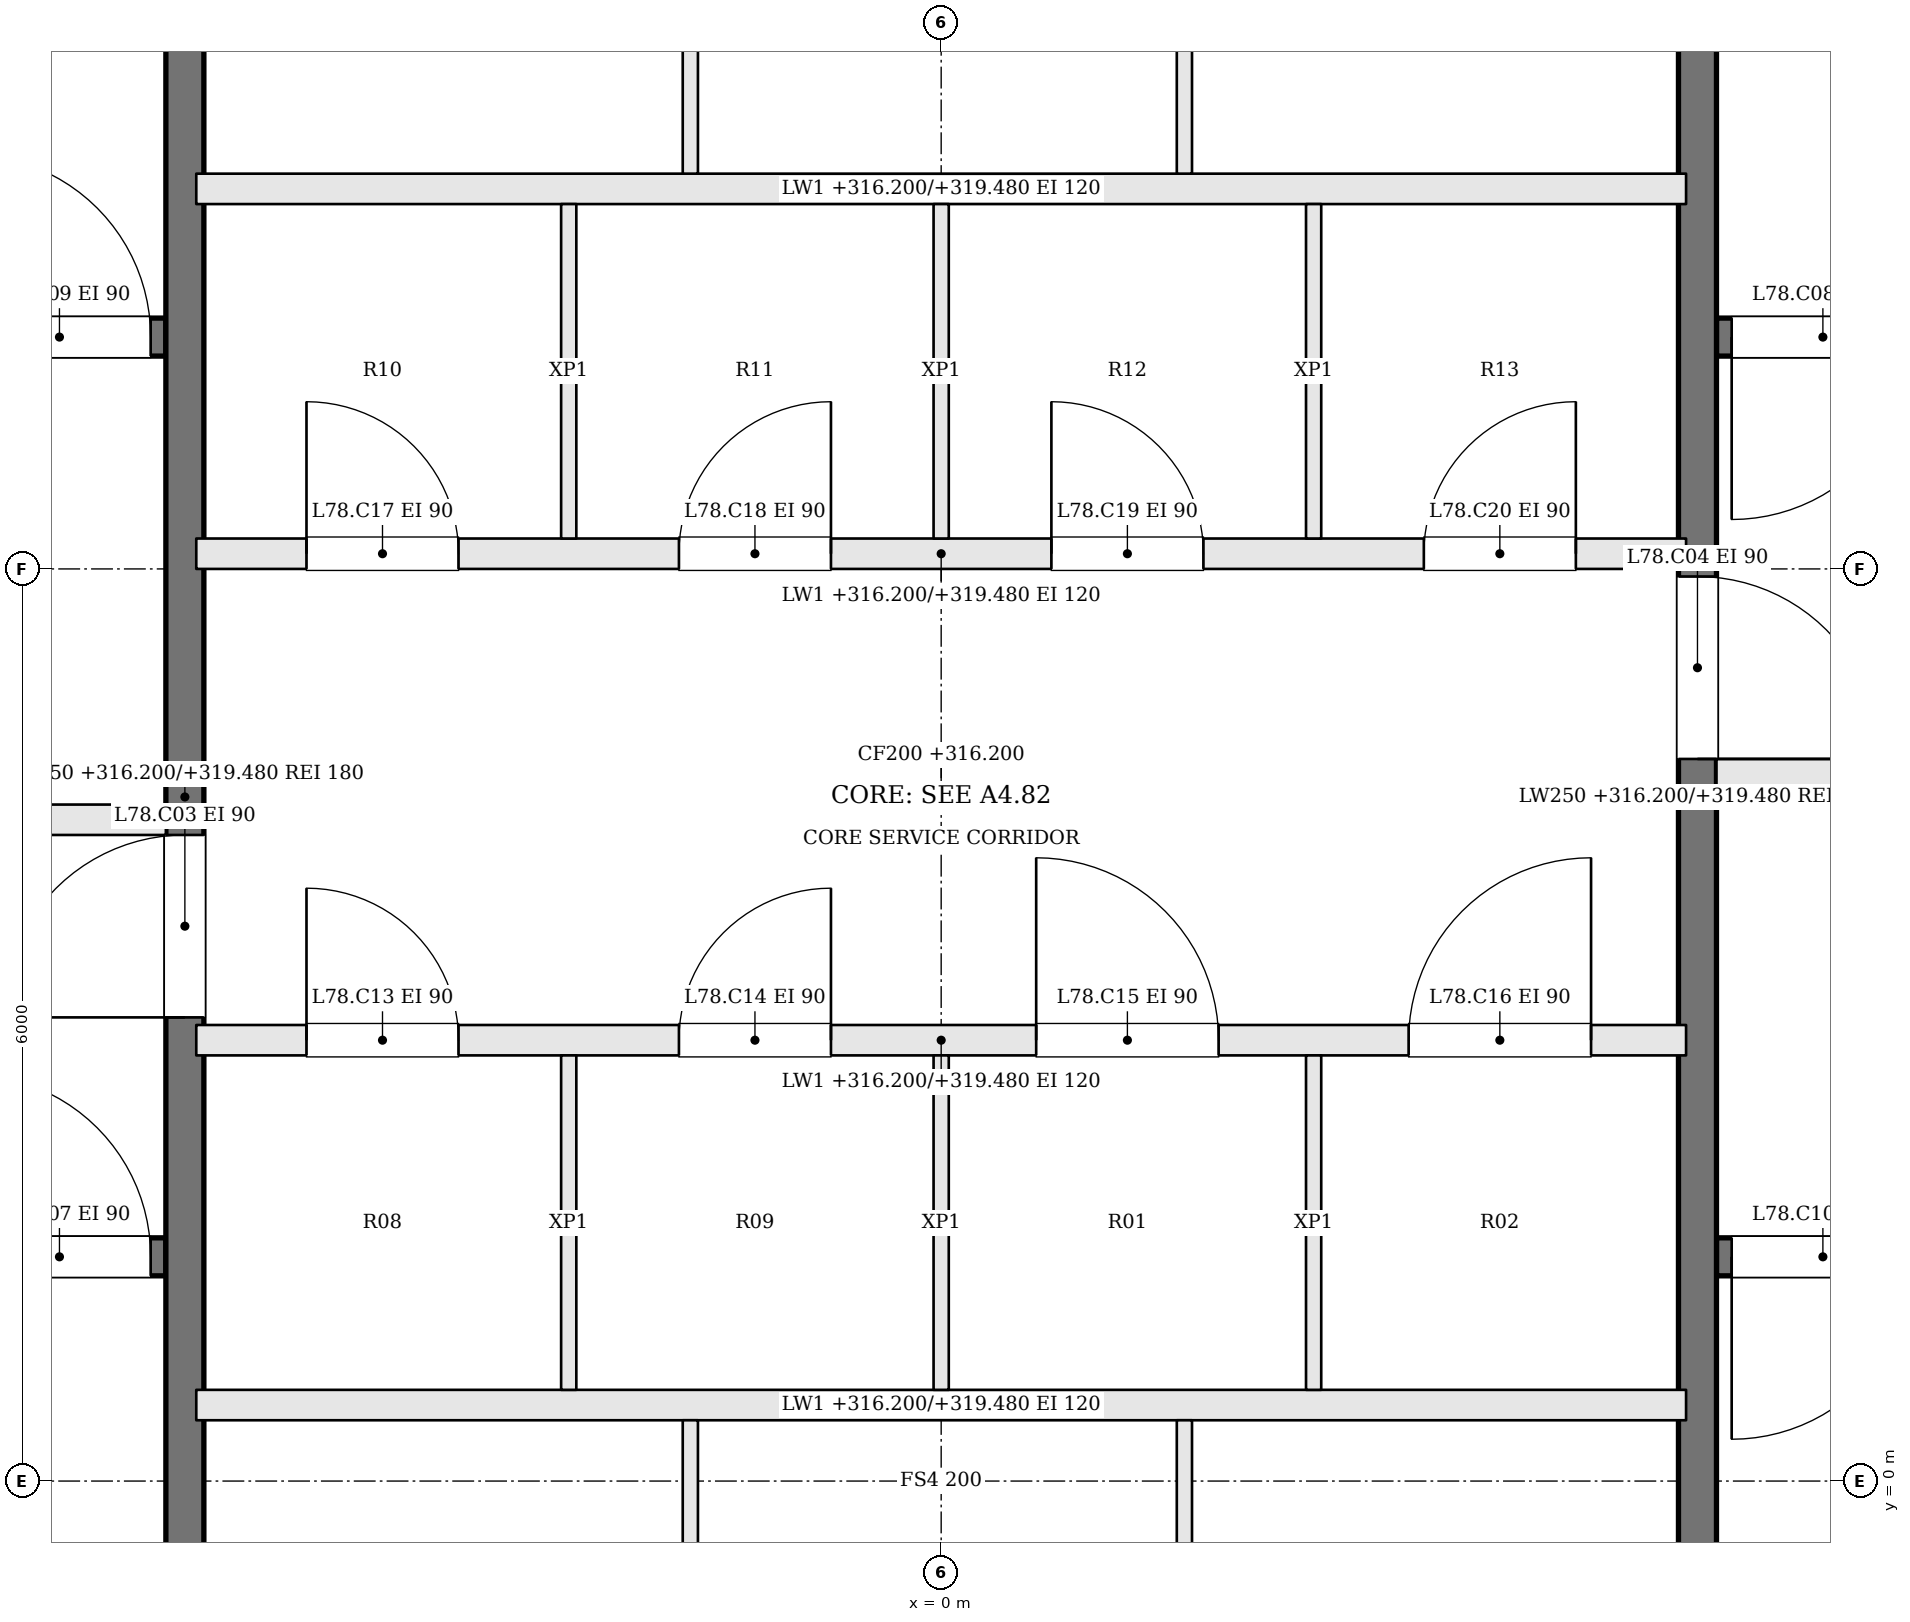
"""IFC4 building model, lengths in metres.
Left out: names, types, materials, properties, quantities, classifications, styles, units other than length and angle.
Written with IfcOpenShell. Run it as: python <this file> out.ifc"""

import sys

from ifc_helpers import new_model, si_unit, direction, frame, frame_2d, origin, place, context, subcontext, project, spatial, rectangle, extrude, element, fill, save


model = new_model("IFC4")
c1 = context("Model", 3, precision=1e-05, world=origin(), true_north=direction((0.0, 1.0)))
c2 = subcontext(c1, "Body", "Model", "MODEL_VIEW")
j1 = project(units=[si_unit("LENGTHUNIT", "METRE"), si_unit("PLANEANGLEUNIT", "RADIAN")], contexts=[c1])
p1 = place(None, origin())
s1 = spatial("IfcSite", under=j1, at=p1, CompositionType="ELEMENT")
p2 = place(p1, origin())
s2 = spatial("IfcBuilding", under=s1, at=p2, CompositionType="ELEMENT")
p3 = place(p2, frame((0.0, 0.0, 316.2)))
s3 = spatial("IfcBuildingStorey", under=s2, at=p3, CompositionType="ELEMENT", Elevation=316.2)
p4 = place(p3, frame((-12.2, 1.475, 0.0), z_axis=(0.0, 0.0, 1.0), x_axis=(1.0, 0.0, 0.0)))
e1 = element("IfcWall", 1, at=p4, inside=s3, PredefinedType="SOLIDWALL", context=c2, shape_type="SweptSolid", body=[
    extrude(rectangle(XDim=7.1, YDim=0.25, at=frame_2d((3.55, 0.0))), origin(), (0.0, 0.0, 1.0), 3.28),
])
p5 = place(p4, frame((5.8, 0.0, 0.0)))
e2 = element("IfcOpeningElement", 2, at=p5, cuts=e1, PredefinedType="OPENING", context=c2, shape_type="SweptSolid", body=[
    extrude(rectangle(XDim=1.2, YDim=2.1, at=frame_2d((0.6, 1.05))), frame((0.0, 0.135, 0.0), z_axis=(0.0, -1.0, 0.0), x_axis=(1.0, 0.0, 0.0)), (0.0, 0.0, 1.0), 0.27),
])
p6 = place(p3, frame((12.2, 7.525, 0.0), z_axis=(0.0, 0.0, 1.0), x_axis=(-1.0, 0.0, 0.0)))
e3 = element("IfcWall", 3, at=p6, inside=s3, PredefinedType="SOLIDWALL", context=c2, shape_type="SweptSolid", body=[
    extrude(rectangle(XDim=7.1, YDim=0.25, at=frame_2d((3.55, 0.0))), origin(), (0.0, 0.0, 1.0), 3.28),
])
p7 = place(p6, frame((5.8, 0.0, 0.0)))
e4 = element("IfcOpeningElement", 4, at=p7, cuts=e3, PredefinedType="OPENING", context=c2, shape_type="SweptSolid", body=[
    extrude(rectangle(XDim=1.2, YDim=2.1, at=frame_2d((0.6, 1.05))), frame((0.0, 0.135, 0.0), z_axis=(0.0, -1.0, 0.0), x_axis=(1.0, 0.0, 0.0)), (0.0, 0.0, 1.0), 0.27),
])
p8 = place(p3, frame((-12.2, 4.35, 0.0), z_axis=(0.0, 0.0, 1.0), x_axis=(1.0, 0.0, 0.0)))
e5 = element("IfcWall", 5, at=p8, inside=s3, PredefinedType="SOLIDWALL", context=c2, shape_type="SweptSolid", body=[
    extrude(rectangle(XDim=7.1, YDim=0.2, at=frame_2d((3.55, 0.0))), origin(), (0.0, 0.0, 1.0), 3.28),
])
p9 = place(p8, frame((4.4, 0.0, 0.0)))
e6 = element("IfcOpeningElement", 6, at=p9, cuts=e5, PredefinedType="OPENING", context=c2, shape_type="SweptSolid", body=[
    extrude(rectangle(XDim=1.2, YDim=2.1, at=frame_2d((0.6, 1.05))), frame((0.0, 0.11, 0.0), z_axis=(0.0, -1.0, 0.0), x_axis=(1.0, 0.0, 0.0)), (0.0, 0.0, 1.0), 0.22),
])
p10 = place(p8, frame((1.1, 0.0, 0.0)))
e7 = element("IfcOpeningElement", 7, at=p10, cuts=e5, PredefinedType="OPENING", context=c2, shape_type="SweptSolid", body=[
    extrude(rectangle(XDim=1.2, YDim=2.1, at=frame_2d((0.6, 1.05))), frame((0.0, 0.11, 0.0), z_axis=(0.0, -1.0, 0.0), x_axis=(1.0, 0.0, 0.0)), (0.0, 0.0, 1.0), 0.22),
])
p11 = place(p3, frame((12.2, 4.65, 0.0), z_axis=(0.0, 0.0, 1.0), x_axis=(-1.0, 0.0, 0.0)))
e8 = element("IfcWall", 8, at=p11, inside=s3, PredefinedType="SOLIDWALL", context=c2, shape_type="SweptSolid", body=[
    extrude(rectangle(XDim=7.1, YDim=0.2, at=frame_2d((3.55, 0.0))), origin(), (0.0, 0.0, 1.0), 3.28),
])
p12 = place(p11, frame((4.4, 0.0, 0.0)))
e9 = element("IfcOpeningElement", 9, at=p12, cuts=e8, PredefinedType="OPENING", context=c2, shape_type="SweptSolid", body=[
    extrude(rectangle(XDim=1.2, YDim=2.1, at=frame_2d((0.6, 1.05))), frame((0.0, 0.11, 0.0), z_axis=(0.0, -1.0, 0.0), x_axis=(1.0, 0.0, 0.0)), (0.0, 0.0, 1.0), 0.22),
])
p13 = place(p11, frame((1.1, 0.0, 0.0)))
e10 = element("IfcOpeningElement", 10, at=p13, cuts=e8, PredefinedType="OPENING", context=c2, shape_type="SweptSolid", body=[
    extrude(rectangle(XDim=1.2, YDim=2.1, at=frame_2d((0.6, 1.05))), frame((0.0, 0.11, 0.0), z_axis=(0.0, -1.0, 0.0), x_axis=(1.0, 0.0, 0.0)), (0.0, 0.0, 1.0), 0.22),
])
p14 = place(p3, frame((-12.2, 7.525, 0.0), z_axis=(0.0, 0.0, 1.0), x_axis=(1.0, 0.0, 0.0)))
e11 = element("IfcWall", 11, at=p14, inside=s3, PredefinedType="SOLIDWALL", context=c2, shape_type="SweptSolid", body=[
    extrude(rectangle(XDim=7.1, YDim=0.25, at=frame_2d((3.55, 0.0))), origin(), (0.0, 0.0, 1.0), 3.28),
])
p15 = place(p14, frame((5.8, 0.0, 0.0)))
e12 = element("IfcOpeningElement", 12, at=p15, cuts=e11, PredefinedType="OPENING", context=c2, shape_type="SweptSolid", body=[
    extrude(rectangle(XDim=1.2, YDim=2.1, at=frame_2d((0.6, 1.05))), frame((0.0, 0.135, 0.0), z_axis=(0.0, -1.0, 0.0), x_axis=(1.0, 0.0, 0.0)), (0.0, 0.0, 1.0), 0.27),
])
p16 = place(p3, frame((12.2, 1.475, 0.0), z_axis=(0.0, 0.0, 1.0), x_axis=(-1.0, 0.0, 0.0)))
e13 = element("IfcWall", 13, at=p16, inside=s3, PredefinedType="SOLIDWALL", context=c2, shape_type="SweptSolid", body=[
    extrude(rectangle(XDim=7.1, YDim=0.25, at=frame_2d((3.55, 0.0))), origin(), (0.0, 0.0, 1.0), 3.28),
])
p17 = place(p16, frame((5.8, 0.0, 0.0)))
e14 = element("IfcOpeningElement", 14, at=p17, cuts=e13, PredefinedType="OPENING", context=c2, shape_type="SweptSolid", body=[
    extrude(rectangle(XDim=1.2, YDim=2.1, at=frame_2d((0.6, 1.05))), frame((0.0, 0.135, 0.0), z_axis=(0.0, -1.0, 0.0), x_axis=(1.0, 0.0, 0.0)), (0.0, 0.0, 1.0), 0.27),
])
p18 = place(p3, frame((-4.975, -2.2, 0.0), z_axis=(0.0, 0.0, 1.0), x_axis=(0.0, 1.0, 0.0)))
e15 = element("IfcWall", 15, at=p18, inside=s3, PredefinedType="SOLIDWALL", context=c2, shape_type="SweptSolid", body=[
    extrude(rectangle(XDim=13.4, YDim=0.25, at=frame_2d((6.7, 0.0))), origin(), (0.0, 0.0, 1.0), 3.28),
])
p19 = place(p18, frame((5.25, 0.0, 0.0)))
e16 = element("IfcOpeningElement", 16, at=p19, cuts=e15, PredefinedType="OPENING", context=c2, shape_type="SweptSolid", body=[
    extrude(rectangle(XDim=1.2, YDim=2.1, at=frame_2d((0.6, 1.05))), frame((0.0, 0.135, 0.0), z_axis=(0.0, -1.0, 0.0), x_axis=(1.0, 0.0, 0.0)), (0.0, 0.0, 1.0), 0.27),
])
p20 = place(p3, frame((4.975, 11.2, 0.0), z_axis=(0.0, 0.0, 1.0), x_axis=(0.0, -1.0, 0.0)))
e17 = element("IfcWall", 17, at=p20, inside=s3, PredefinedType="SOLIDWALL", context=c2, shape_type="SweptSolid", body=[
    extrude(rectangle(XDim=13.4, YDim=0.25, at=frame_2d((6.7, 0.0))), origin(), (0.0, 0.0, 1.0), 3.28),
])
p21 = place(p20, frame((5.25, 0.0, 0.0)))
e18 = element("IfcOpeningElement", 18, at=p21, cuts=e17, PredefinedType="OPENING", context=c2, shape_type="SweptSolid", body=[
    extrude(rectangle(XDim=1.2, YDim=2.1, at=frame_2d((0.6, 1.05))), frame((0.0, 0.135, 0.0), z_axis=(0.0, -1.0, 0.0), x_axis=(1.0, 0.0, 0.0)), (0.0, 0.0, 1.0), 0.27),
])
p22 = place(p3, frame((-4.9, 0.5, 0.0), z_axis=(0.0, 0.0, 1.0), x_axis=(1.0, 0.0, 0.0)))
e19 = element("IfcWall", 19, at=p22, inside=s3, PredefinedType="SOLIDWALL", context=c2, shape_type="SweptSolid", body=[
    extrude(rectangle(XDim=9.8, YDim=0.2, at=frame_2d((4.9, 0.0))), origin(), (0.0, 0.0, 1.0), 3.28),
])
p23 = place(p3, frame((-4.9, 2.9, 0.0), z_axis=(0.0, 0.0, 1.0), x_axis=(1.0, 0.0, 0.0)))
e20 = element("IfcWall", 20, at=p23, inside=s3, PredefinedType="SOLIDWALL", context=c2, shape_type="SweptSolid", body=[
    extrude(rectangle(XDim=9.8, YDim=0.2, at=frame_2d((4.9, 0.0))), origin(), (0.0, 0.0, 1.0), 3.28),
])
p24 = place(p23, frame((0.725, 0.0, 0.0)))
e21 = element("IfcOpeningElement", 21, at=p24, cuts=e20, PredefinedType="OPENING", context=c2, shape_type="SweptSolid", body=[
    extrude(rectangle(XDim=1.0, YDim=2.1, at=frame_2d((0.5, 1.05))), frame((0.0, 0.11, 0.0), z_axis=(0.0, -1.0, 0.0), x_axis=(1.0, 0.0, 0.0)), (0.0, 0.0, 1.0), 0.22),
])
p25 = place(p23, frame((3.175, 0.0, 0.0)))
e22 = element("IfcOpeningElement", 22, at=p25, cuts=e20, PredefinedType="OPENING", context=c2, shape_type="SweptSolid", body=[
    extrude(rectangle(XDim=1.0, YDim=2.1, at=frame_2d((0.5, 1.05))), frame((0.0, 0.11, 0.0), z_axis=(0.0, -1.0, 0.0), x_axis=(1.0, 0.0, 0.0)), (0.0, 0.0, 1.0), 0.22),
])
p26 = place(p23, frame((5.525, 0.0, 0.0)))
e23 = element("IfcOpeningElement", 23, at=p26, cuts=e20, PredefinedType="OPENING", context=c2, shape_type="SweptSolid", body=[
    extrude(rectangle(XDim=1.2, YDim=2.1, at=frame_2d((0.6, 1.05))), frame((0.0, 0.11, 0.0), z_axis=(0.0, -1.0, 0.0), x_axis=(1.0, 0.0, 0.0)), (0.0, 0.0, 1.0), 0.22),
])
p27 = place(p23, frame((7.975, 0.0, 0.0)))
e24 = element("IfcOpeningElement", 24, at=p27, cuts=e20, PredefinedType="OPENING", context=c2, shape_type="SweptSolid", body=[
    extrude(rectangle(XDim=1.2, YDim=2.1, at=frame_2d((0.6, 1.05))), frame((0.0, 0.11, 0.0), z_axis=(0.0, -1.0, 0.0), x_axis=(1.0, 0.0, 0.0)), (0.0, 0.0, 1.0), 0.22),
])
p28 = place(p3, frame((-4.9, 6.1, 0.0), z_axis=(0.0, 0.0, 1.0), x_axis=(1.0, 0.0, 0.0)))
e25 = element("IfcWall", 25, at=p28, inside=s3, PredefinedType="SOLIDWALL", context=c2, shape_type="SweptSolid", body=[
    extrude(rectangle(XDim=9.8, YDim=0.2, at=frame_2d((4.9, 0.0))), origin(), (0.0, 0.0, 1.0), 3.28),
])
p29 = place(p28, frame((0.725, 0.0, 0.0)))
e26 = element("IfcOpeningElement", 26, at=p29, cuts=e25, PredefinedType="OPENING", context=c2, shape_type="SweptSolid", body=[
    extrude(rectangle(XDim=1.0, YDim=2.1, at=frame_2d((0.5, 1.05))), frame((0.0, 0.11, 0.0), z_axis=(0.0, -1.0, 0.0), x_axis=(1.0, 0.0, 0.0)), (0.0, 0.0, 1.0), 0.22),
])
p30 = place(p28, frame((3.175, 0.0, 0.0)))
e27 = element("IfcOpeningElement", 27, at=p30, cuts=e25, PredefinedType="OPENING", context=c2, shape_type="SweptSolid", body=[
    extrude(rectangle(XDim=1.0, YDim=2.1, at=frame_2d((0.5, 1.05))), frame((0.0, 0.11, 0.0), z_axis=(0.0, -1.0, 0.0), x_axis=(1.0, 0.0, 0.0)), (0.0, 0.0, 1.0), 0.22),
])
p31 = place(p28, frame((5.625, 0.0, 0.0)))
e28 = element("IfcOpeningElement", 28, at=p31, cuts=e25, PredefinedType="OPENING", context=c2, shape_type="SweptSolid", body=[
    extrude(rectangle(XDim=1.0, YDim=2.1, at=frame_2d((0.5, 1.05))), frame((0.0, 0.11, 0.0), z_axis=(0.0, -1.0, 0.0), x_axis=(1.0, 0.0, 0.0)), (0.0, 0.0, 1.0), 0.22),
])
p32 = place(p28, frame((8.075, 0.0, 0.0)))
e29 = element("IfcOpeningElement", 29, at=p32, cuts=e25, PredefinedType="OPENING", context=c2, shape_type="SweptSolid", body=[
    extrude(rectangle(XDim=1.0, YDim=2.1, at=frame_2d((0.5, 1.05))), frame((0.0, 0.11, 0.0), z_axis=(0.0, -1.0, 0.0), x_axis=(1.0, 0.0, 0.0)), (0.0, 0.0, 1.0), 0.22),
])
p33 = place(p3, frame((-4.9, 8.5, 0.0), z_axis=(0.0, 0.0, 1.0), x_axis=(1.0, 0.0, 0.0)))
e30 = element("IfcWall", 30, at=p33, inside=s3, PredefinedType="SOLIDWALL", context=c2, shape_type="SweptSolid", body=[
    extrude(rectangle(XDim=9.8, YDim=0.2, at=frame_2d((4.9, 0.0))), origin(), (0.0, 0.0, 1.0), 3.28),
])
for number, where, z_axis, x_axis in (
    (31, (-2.45, 0.6, 0.0), (0.0, 0.0, 1.0), (0.0, 1.0, 0.0)),
    (32, (0.0, 0.6, 0.0), (0.0, 0.0, 1.0), (0.0, 1.0, 0.0)),
    (33, (2.45, 0.6, 0.0), (0.0, 0.0, 1.0), (0.0, 1.0, 0.0)),
    (34, (-2.45, 6.2, 0.0), (0.0, 0.0, 1.0), (0.0, 1.0, 0.0)),
    (35, (0.0, 6.2, 0.0), (0.0, 0.0, 1.0), (0.0, 1.0, 0.0)),
    (36, (2.45, 6.2, 0.0), (0.0, 0.0, 1.0), (0.0, 1.0, 0.0)),
):
    element("IfcWall", number, at=place(p3, frame(where, z_axis=z_axis, x_axis=x_axis)), inside=s3, PredefinedType="PARTITIONING", context=c2, shape_type="SweptSolid", body=[
        extrude(rectangle(XDim=2.2, YDim=0.1, at=frame_2d((1.1, 0.0))), origin(), (0.0, 0.0, 1.0), 3.28),
    ])
for number, where, z_axis, x_axis in (
    (37, (-1.65, -2.2, 0.0), (0.0, 0.0, 1.0), (0.0, 1.0, 0.0)),
    (38, (1.6, -2.2, 0.0), (0.0, 0.0, 1.0), (0.0, 1.0, 0.0)),
    (39, (-1.65, 8.6, 0.0), (0.0, 0.0, 1.0), (0.0, 1.0, 0.0)),
    (40, (1.6, 8.6, 0.0), (0.0, 0.0, 1.0), (0.0, 1.0, 0.0)),
):
    element("IfcWall", number, at=place(p3, frame(where, z_axis=z_axis, x_axis=x_axis)), inside=s3, PredefinedType="PARTITIONING", context=c2, shape_type="SweptSolid", body=[
        extrude(rectangle(XDim=2.6, YDim=0.1, at=frame_2d((1.3, 0.0))), origin(), (0.0, 0.0, 1.0), 3.28),
    ])
p34 = place(p19, origin())
e41 = element("IfcDoor", 41, at=p34, inside=s3, OperationType="SINGLE_SWING_LEFT", PredefinedType="DOOR", context=c2, shape_type="SweptSolid", body=[
    extrude(rectangle(XDim=1.2, YDim=2.1, at=frame_2d((0.6, 1.05))), frame((0.0, 0.025, 0.0), z_axis=(0.0, -1.0, 0.0), x_axis=(1.0, 0.0, 0.0)), (0.0, 0.0, 1.0), 0.05),
])
fill(e16, e41)
p35 = place(p21, origin())
e42 = element("IfcDoor", 42, at=p35, inside=s3, OperationType="SINGLE_SWING_RIGHT", PredefinedType="DOOR", context=c2, shape_type="SweptSolid", body=[
    extrude(rectangle(XDim=1.2, YDim=2.1, at=frame_2d((0.6, 1.05))), frame((0.0, 0.025, 0.0), z_axis=(0.0, -1.0, 0.0), x_axis=(1.0, 0.0, 0.0)), (0.0, 0.0, 1.0), 0.05),
])
fill(e18, e42)
p36 = place(p5, origin())
e43 = element("IfcDoor", 43, at=p36, inside=s3, OperationType="SINGLE_SWING_LEFT", PredefinedType="DOOR", context=c2, shape_type="SweptSolid", body=[
    extrude(rectangle(XDim=1.2, YDim=2.1, at=frame_2d((0.6, 1.05))), frame((0.0, 0.025, 0.0), z_axis=(0.0, -1.0, 0.0), x_axis=(1.0, 0.0, 0.0)), (0.0, 0.0, 1.0), 0.05),
])
fill(e2, e43)
p37 = place(p7, origin())
e44 = element("IfcDoor", 44, at=p37, inside=s3, OperationType="SINGLE_SWING_RIGHT", PredefinedType="DOOR", context=c2, shape_type="SweptSolid", body=[
    extrude(rectangle(XDim=1.2, YDim=2.1, at=frame_2d((0.6, 1.05))), frame((0.0, 0.025, 0.0), z_axis=(0.0, -1.0, 0.0), x_axis=(1.0, 0.0, 0.0)), (0.0, 0.0, 1.0), 0.05),
])
fill(e4, e44)
p38 = place(p15, origin())
e45 = element("IfcDoor", 45, at=p38, inside=s3, OperationType="SINGLE_SWING_LEFT", PredefinedType="DOOR", context=c2, shape_type="SweptSolid", body=[
    extrude(rectangle(XDim=1.2, YDim=2.1, at=frame_2d((0.6, 1.05))), frame((0.0, 0.025, 0.0), z_axis=(0.0, -1.0, 0.0), x_axis=(1.0, 0.0, 0.0)), (0.0, 0.0, 1.0), 0.05),
])
fill(e12, e45)
p39 = place(p17, origin())
e46 = element("IfcDoor", 46, at=p39, inside=s3, OperationType="SINGLE_SWING_RIGHT", PredefinedType="DOOR", context=c2, shape_type="SweptSolid", body=[
    extrude(rectangle(XDim=1.2, YDim=2.1, at=frame_2d((0.6, 1.05))), frame((0.0, 0.025, 0.0), z_axis=(0.0, -1.0, 0.0), x_axis=(1.0, 0.0, 0.0)), (0.0, 0.0, 1.0), 0.05),
])
fill(e14, e46)
p40 = place(p24, origin())
e47 = element("IfcDoor", 47, at=p40, inside=s3, OperationType="SINGLE_SWING_LEFT", PredefinedType="DOOR", context=c2, shape_type="SweptSolid", body=[
    extrude(rectangle(XDim=1.0, YDim=2.1, at=frame_2d((0.5, 1.05))), frame((0.0, 0.025, 0.0), z_axis=(0.0, -1.0, 0.0), x_axis=(1.0, 0.0, 0.0)), (0.0, 0.0, 1.0), 0.05),
])
fill(e21, e47)
p41 = place(p25, origin())
e48 = element("IfcDoor", 48, at=p41, inside=s3, OperationType="SINGLE_SWING_RIGHT", PredefinedType="DOOR", context=c2, shape_type="SweptSolid", body=[
    extrude(rectangle(XDim=1.0, YDim=2.1, at=frame_2d((0.5, 1.05))), frame((0.0, 0.025, 0.0), z_axis=(0.0, -1.0, 0.0), x_axis=(1.0, 0.0, 0.0)), (0.0, 0.0, 1.0), 0.05),
])
fill(e22, e48)
p42 = place(p26, origin())
e49 = element("IfcDoor", 49, at=p42, inside=s3, OperationType="SINGLE_SWING_LEFT", PredefinedType="DOOR", context=c2, shape_type="SweptSolid", body=[
    extrude(rectangle(XDim=1.2, YDim=2.1, at=frame_2d((0.6, 1.05))), frame((0.0, 0.025, 0.0), z_axis=(0.0, -1.0, 0.0), x_axis=(1.0, 0.0, 0.0)), (0.0, 0.0, 1.0), 0.05),
])
fill(e23, e49)
p43 = place(p27, origin())
e50 = element("IfcDoor", 50, at=p43, inside=s3, OperationType="SINGLE_SWING_RIGHT", PredefinedType="DOOR", context=c2, shape_type="SweptSolid", body=[
    extrude(rectangle(XDim=1.2, YDim=2.1, at=frame_2d((0.6, 1.05))), frame((0.0, 0.025, 0.0), z_axis=(0.0, -1.0, 0.0), x_axis=(1.0, 0.0, 0.0)), (0.0, 0.0, 1.0), 0.05),
])
fill(e24, e50)
p44 = place(p29, origin())
e51 = element("IfcDoor", 51, at=p44, inside=s3, OperationType="SINGLE_SWING_LEFT", PredefinedType="DOOR", context=c2, shape_type="SweptSolid", body=[
    extrude(rectangle(XDim=1.0, YDim=2.1, at=frame_2d((0.5, 1.05))), frame((0.0, 0.025, 0.0), z_axis=(0.0, -1.0, 0.0), x_axis=(1.0, 0.0, 0.0)), (0.0, 0.0, 1.0), 0.05),
])
fill(e26, e51)
p45 = place(p30, origin())
e52 = element("IfcDoor", 52, at=p45, inside=s3, OperationType="SINGLE_SWING_RIGHT", PredefinedType="DOOR", context=c2, shape_type="SweptSolid", body=[
    extrude(rectangle(XDim=1.0, YDim=2.1, at=frame_2d((0.5, 1.05))), frame((0.0, 0.025, 0.0), z_axis=(0.0, -1.0, 0.0), x_axis=(1.0, 0.0, 0.0)), (0.0, 0.0, 1.0), 0.05),
])
fill(e27, e52)
p46 = place(p31, origin())
e53 = element("IfcDoor", 53, at=p46, inside=s3, OperationType="SINGLE_SWING_LEFT", PredefinedType="DOOR", context=c2, shape_type="SweptSolid", body=[
    extrude(rectangle(XDim=1.0, YDim=2.1, at=frame_2d((0.5, 1.05))), frame((0.0, 0.025, 0.0), z_axis=(0.0, -1.0, 0.0), x_axis=(1.0, 0.0, 0.0)), (0.0, 0.0, 1.0), 0.05),
])
fill(e28, e53)
p47 = place(p32, origin())
e54 = element("IfcDoor", 54, at=p47, inside=s3, OperationType="SINGLE_SWING_RIGHT", PredefinedType="DOOR", context=c2, shape_type="SweptSolid", body=[
    extrude(rectangle(XDim=1.0, YDim=2.1, at=frame_2d((0.5, 1.05))), frame((0.0, 0.025, 0.0), z_axis=(0.0, -1.0, 0.0), x_axis=(1.0, 0.0, 0.0)), (0.0, 0.0, 1.0), 0.05),
])
fill(e29, e54)
save(model, sys.argv[1])
